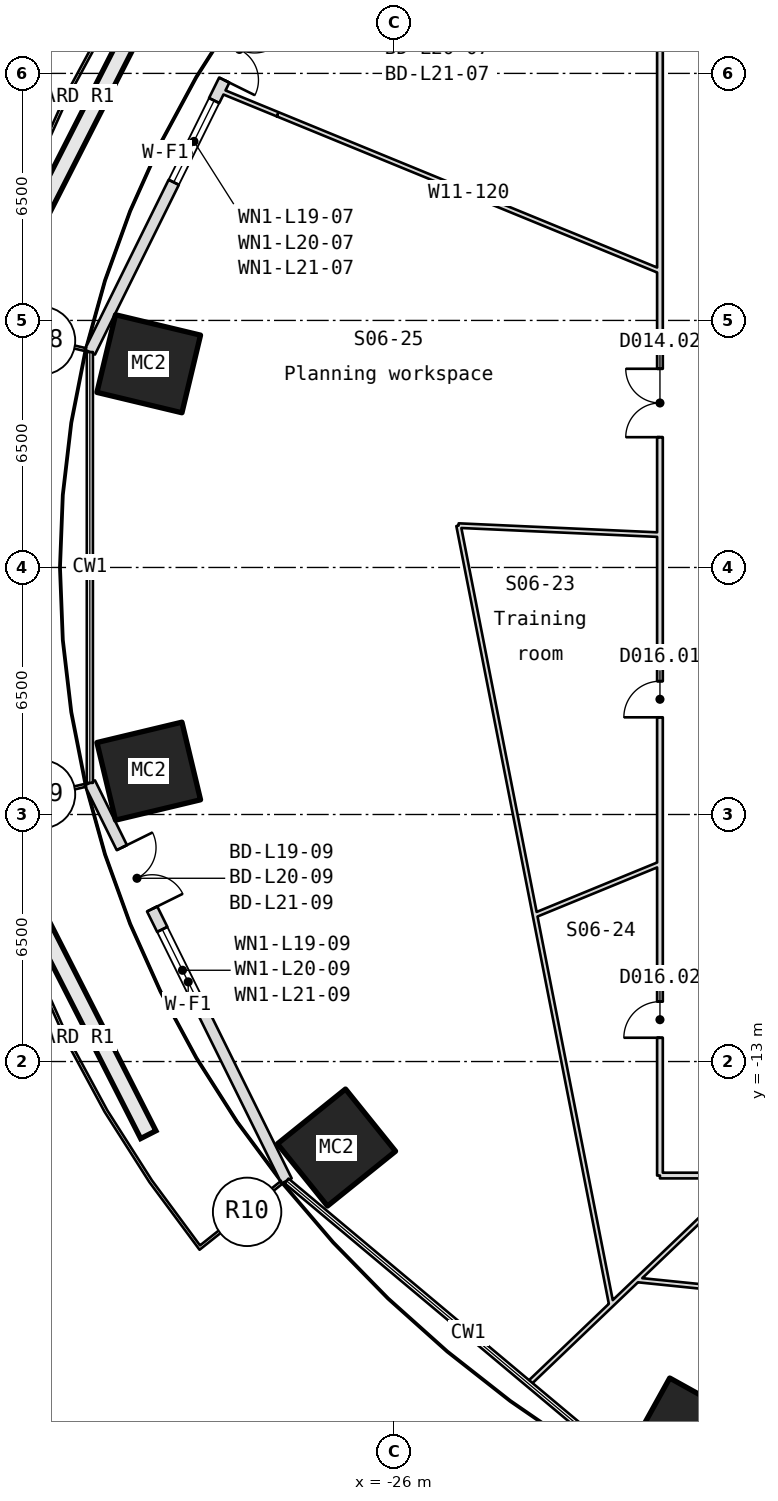
"""IFC4 building model, lengths in metres.
Left out: names, types, materials, properties, quantities, classifications, styles, units other than length and angle.
Written with IfcOpenShell. Run it as: python <this file> out.ifc"""

import sys

from ifc_helpers import new_model, si_unit, direction, frame, frame_2d, origin, origin_2d, place, context, subcontext, project, spatial, rectangle, hollow_rectangle, extrude, element, fill, save


model = new_model("IFC4")
c1 = context("Model", 3, precision=1e-05, world=origin(), true_north=direction((0.0, 1.0)))
c2 = subcontext(c1, "Body", "Model", "MODEL_VIEW")
j1 = project(units=[si_unit("LENGTHUNIT", "METRE"), si_unit("PLANEANGLEUNIT", "RADIAN")], contexts=[c1])
p1 = place(None, origin())
s1 = spatial("IfcSite", under=j1, at=p1, CompositionType="ELEMENT")
p2 = place(p1, origin())
s2 = spatial("IfcBuilding", under=s1, at=p2, CompositionType="ELEMENT")
p3 = place(p2, frame((0.0, 0.0, 95.25)))
s3 = spatial("IfcBuildingStorey", under=s2, at=p3, CompositionType="ELEMENT", Elevation=95.25)
for number, where, z_axis, x_axis in (
    (1, (-32.452, 5.36, -0.18), (0.0, 0.0, 1.0), (0.233, 0.972, 0.0)),
    (2, (-32.452, -5.36, -0.18), (0.0, 0.0, 1.0), (-0.233, 0.972, 0.0)),
    (3, (-27.512, -15.263, -0.18), (0.0, 0.0, 1.0), (-0.627, 0.779, 0.0)),
    (4, (-18.383, -22.843, -0.18), (0.0, 0.0, 1.0), (-0.874, 0.485, 0.0)),
):
    element("IfcColumn", number, at=place(p3, frame(where, z_axis=z_axis, x_axis=x_axis)), inside=s3, PredefinedType="COLUMN", context=c2, shape_type="SweptSolid", body=[
        extrude(hollow_rectangle(XDim=2.1, YDim=2.3, WallThickness=0.085, at=origin_2d()), origin(), (0.0, 0.0, 1.0), 4.15),
    ])
p4 = place(p3, frame((-28.825, 16.141, 0.0), z_axis=(0.0, 0.0, 1.0), x_axis=(-0.4430961796, -0.896474079728, 0.0)))
e5 = element("IfcWall", 5, at=p4, inside=s3, PredefinedType="SOLIDWALL", context=c2, shape_type="SweptSolid", body=[
    extrude(rectangle(XDim=11.683, YDim=0.3, at=frame_2d((5.841, 0.0))), origin(), (0.0, 0.0, 1.0), 3.97),
])
p5 = place(p4, frame((1.9, 0.0, 0.0)))
e6 = element("IfcOpeningElement", 6, at=p5, cuts=e5, PredefinedType="OPENING", context=c2, shape_type="SweptSolid", body=[
    extrude(rectangle(XDim=1.8, YDim=2.4, at=frame_2d((0.9, 1.2))), frame((0.0, 0.16, 0.0), z_axis=(0.0, -1.0, 0.0), x_axis=(1.0, 0.0, 0.0)), (0.0, 0.0, 1.0), 0.32),
])
p6 = place(p4, frame((4.3, 0.0, 0.9)))
e7 = element("IfcOpeningElement", 7, at=p6, cuts=e5, PredefinedType="OPENING", context=c2, shape_type="SweptSolid", body=[
    extrude(rectangle(XDim=2.4, YDim=1.5, at=frame_2d((1.2, 0.75))), frame((0.0, 0.16, 0.0), z_axis=(0.0, -1.0, 0.0), x_axis=(1.0, 0.0, 0.0)), (0.0, 0.0, 1.0), 0.32),
])
p7 = place(p3, frame((-34.002, -5.668, 0.0), z_axis=(0.0, 0.0, 1.0), x_axis=(0.4430961796, -0.896474079728, 0.0)))
e8 = element("IfcWall", 8, at=p7, inside=s3, PredefinedType="SOLIDWALL", context=c2, shape_type="SweptSolid", body=[
    extrude(rectangle(XDim=11.683, YDim=0.3, at=frame_2d((5.841, 0.0))), origin(), (0.0, 0.0, 1.0), 3.97),
])
p8 = place(p7, frame((1.9, 0.0, 0.0)))
e9 = element("IfcOpeningElement", 9, at=p8, cuts=e8, PredefinedType="OPENING", context=c2, shape_type="SweptSolid", body=[
    extrude(rectangle(XDim=1.8, YDim=2.4, at=frame_2d((0.9, 1.2))), frame((0.0, 0.16, 0.0), z_axis=(0.0, -1.0, 0.0), x_axis=(1.0, 0.0, 0.0)), (0.0, 0.0, 1.0), 0.32),
])
p9 = place(p7, frame((4.3, 0.0, 0.9)))
e10 = element("IfcOpeningElement", 10, at=p9, cuts=e8, PredefinedType="OPENING", context=c2, shape_type="SweptSolid", body=[
    extrude(rectangle(XDim=2.4, YDim=1.5, at=frame_2d((1.2, 0.75))), frame((0.0, 0.16, 0.0), z_axis=(0.0, -1.0, 0.0), x_axis=(1.0, 0.0, 0.0)), (0.0, 0.0, 1.0), 0.32),
])
p10 = place(p3, frame((-24.299, 1.102, 0.0), z_axis=(0.0, 0.0, 1.0), x_axis=(0.192428584769, -0.98131098015, 0.0)))
e11 = element("IfcWall", 11, at=p10, inside=s3, PredefinedType="PARTITIONING", context=c2, shape_type="SweptSolid", body=[
    extrude(rectangle(XDim=20.888, YDim=0.12, at=frame_2d((10.444, 0.0))), origin(), (0.0, 0.0, 1.0), 3.97),
])
p11 = place(p3, frame((-24.299, 1.102, 0.0), z_axis=(0.0, 0.0, 1.0), x_axis=(0.998974036647, -0.045286577539, 0.0)))
e12 = element("IfcWall", 12, at=p11, inside=s3, PredefinedType="PARTITIONING", context=c2, shape_type="SweptSolid", body=[
    extrude(rectangle(XDim=5.305, YDim=0.12, at=frame_2d((2.652, 0.0))), origin(), (0.0, 0.0, 1.0), 3.97),
])
p12 = place(p3, frame((-22.29, -9.147, 0.0), z_axis=(0.0, 0.0, 1.0), x_axis=(0.92513955931, 0.379627180008, 0.0)))
e13 = element("IfcWall", 13, at=p12, inside=s3, PredefinedType="PARTITIONING", context=c2, shape_type="SweptSolid", body=[
    extrude(rectangle(XDim=3.556, YDim=0.12, at=frame_2d((1.778, 0.0))), origin(), (0.0, 0.0, 1.0), 3.358),
])
p13 = place(p3, frame((-19.601, -18.747, 0.0), z_axis=(0.0, 0.0, 1.0), x_axis=(0.994814570483, -0.101705311343, 0.0)))
e14 = element("IfcWall", 14, at=p13, inside=s3, PredefinedType="PARTITIONING", context=c2, shape_type="SweptSolid", body=[
    extrude(rectangle(XDim=28.126, YDim=0.12, at=frame_2d((14.063, 0.0))), origin(), (0.0, 0.0, 1.0), 3.97),
])
p14 = place(p13, frame((3.407, 0.0, 0.0)))
e15 = element("IfcOpeningElement", 15, at=p14, cuts=e14, PredefinedType="OPENING", context=c2, shape_type="SweptSolid", body=[
    extrude(rectangle(XDim=0.95, YDim=2.1, at=frame_2d((0.475, 1.05))), frame((0.0, 0.07, 0.0), z_axis=(0.0, -1.0, 0.0), x_axis=(1.0, 0.0, 0.0)), (0.0, 0.0, 1.0), 0.14),
])
p15 = place(p13, frame((12.444, 0.0, 0.0)))
e16 = element("IfcOpeningElement", 16, at=p15, cuts=e14, PredefinedType="OPENING", context=c2, shape_type="SweptSolid", body=[
    extrude(rectangle(XDim=0.95, YDim=2.1, at=frame_2d((0.475, 1.05))), frame((0.0, 0.07, 0.0), z_axis=(0.0, -1.0, 0.0), x_axis=(1.0, 0.0, 0.0)), (0.0, 0.0, 1.0), 0.14),
])
p16 = place(p13, frame((22.625, 0.0, 0.0)))
e17 = element("IfcOpeningElement", 17, at=p16, cuts=e14, PredefinedType="OPENING", context=c2, shape_type="SweptSolid", body=[
    extrude(rectangle(XDim=0.95, YDim=2.1, at=frame_2d((0.475, 1.05))), frame((0.0, 0.07, 0.0), z_axis=(0.0, -1.0, 0.0), x_axis=(1.0, 0.0, 0.0)), (0.0, 0.0, 1.0), 0.14),
])
p17 = place(p3, frame((-19.0, -16.0, 0.0), z_axis=(0.0, 0.0, 1.0), x_axis=(0.0, 1.0, 0.0)))
e18 = element("IfcWall", 18, at=p17, inside=s3, PredefinedType="PARTITIONING", context=c2, shape_type="SweptSolid", body=[
    extrude(rectangle(XDim=32.0, YDim=0.15, at=frame_2d((16.0, 0.0))), origin(), (0.0, 0.0, 1.0), 3.97),
])
p18 = place(p17, frame((12.057, 0.0, 0.0)))
e19 = element("IfcOpeningElement", 19, at=p18, cuts=e18, PredefinedType="OPENING", context=c2, shape_type="SweptSolid", body=[
    extrude(rectangle(XDim=0.95, YDim=2.1, at=frame_2d((0.475, 1.05))), frame((0.0, 0.085, 0.0), z_axis=(0.0, -1.0, 0.0), x_axis=(1.0, 0.0, 0.0)), (0.0, 0.0, 1.0), 0.17),
])
p19 = place(p17, frame((3.626, 0.0, 0.0)))
e20 = element("IfcOpeningElement", 20, at=p19, cuts=e18, PredefinedType="OPENING", context=c2, shape_type="SweptSolid", body=[
    extrude(rectangle(XDim=0.95, YDim=2.1, at=frame_2d((0.475, 1.05))), frame((0.0, 0.085, 0.0), z_axis=(0.0, -1.0, 0.0), x_axis=(1.0, 0.0, 0.0)), (0.0, 0.0, 1.0), 0.17),
])
p20 = place(p17, frame((19.428, 0.0, 0.0)))
e21 = element("IfcOpeningElement", 21, at=p20, cuts=e18, PredefinedType="OPENING", context=c2, shape_type="SweptSolid", body=[
    extrude(rectangle(XDim=1.8, YDim=2.1, at=frame_2d((0.9, 1.05))), frame((0.0, 0.085, 0.0), z_axis=(0.0, -1.0, 0.0), x_axis=(1.0, 0.0, 0.0)), (0.0, 0.0, 1.0), 0.17),
])
p21 = place(p3, frame((-19.0, 7.796, 0.0), z_axis=(0.0, 0.0, 1.0), x_axis=(-0.925143345305, 0.379617953524, 0.0)))
e22 = element("IfcWall", 22, at=p21, inside=s3, PredefinedType="PARTITIONING", context=c2, shape_type="SweptSolid", body=[
    extrude(rectangle(XDim=10.873, YDim=0.12, at=frame_2d((5.437, 0.0))), origin(), (0.0, 0.0, 1.0), 3.358),
])
p22 = place(p3, frame((-29.059, 11.924, 0.0), z_axis=(0.0, 0.0, 1.0), x_axis=(-0.925139536351, 0.379627235957, 0.0)))
e23 = element("IfcWall", 23, at=p22, inside=s3, PredefinedType="PARTITIONING", context=c2, shape_type="SweptSolid", body=[
    extrude(rectangle(XDim=1.663, YDim=0.12, at=frame_2d((0.832, 0.0))), origin(), (0.0, 0.0, 1.0), 3.97),
])
p23 = place(p3, frame((-16.729, -16.0, 0.0), z_axis=(0.0, 0.0, 1.0), x_axis=(-0.722671289977, -0.69119187397, 0.0)))
e24 = element("IfcWall", 24, at=p23, inside=s3, PredefinedType="PARTITIONING", context=c2, shape_type="SweptSolid", body=[
    extrude(rectangle(XDim=7.926, YDim=0.12, at=frame_2d((3.963, 0.0))), origin(), (0.0, 0.0, 1.0), 3.97),
])
p24 = place(p3, frame((19.0, -16.0, 0.0), z_axis=(0.0, 0.0, 1.0), x_axis=(-1.0, 0.0, 0.0)))
e25 = element("IfcWall", 25, at=p24, inside=s3, PredefinedType="PARTITIONING", context=c2, shape_type="SweptSolid", body=[
    extrude(rectangle(XDim=38.0, YDim=0.15, at=frame_2d((19.0, 0.0))), origin(), (0.0, 0.0, 1.0), 3.97),
])
p25 = place(p24, frame((23.362, 0.0, 0.0)))
e26 = element("IfcOpeningElement", 26, at=p25, cuts=e25, PredefinedType="OPENING", context=c2, shape_type="SweptSolid", body=[
    extrude(rectangle(XDim=1.8, YDim=2.1, at=frame_2d((0.9, 1.05))), frame((0.0, 0.085, 0.0), z_axis=(0.0, -1.0, 0.0), x_axis=(1.0, 0.0, 0.0)), (0.0, 0.0, 1.0), 0.17),
])
p26 = place(p24, frame((6.62, 0.0, 0.0)))
e27 = element("IfcOpeningElement", 27, at=p26, cuts=e25, PredefinedType="OPENING", context=c2, shape_type="SweptSolid", body=[
    extrude(rectangle(XDim=0.95, YDim=2.1, at=frame_2d((0.475, 1.05))), frame((0.0, 0.085, 0.0), z_axis=(0.0, -1.0, 0.0), x_axis=(1.0, 0.0, 0.0)), (0.0, 0.0, 1.0), 0.17),
])
p27 = place(p24, frame((1.982, 0.0, 0.0)))
e28 = element("IfcOpeningElement", 28, at=p27, cuts=e25, PredefinedType="OPENING", context=c2, shape_type="SweptSolid", body=[
    extrude(rectangle(XDim=0.95, YDim=2.1, at=frame_2d((0.475, 1.05))), frame((0.0, 0.085, 0.0), z_axis=(0.0, -1.0, 0.0), x_axis=(1.0, 0.0, 0.0)), (0.0, 0.0, 1.0), 0.17),
])
p28 = place(p24, frame((10.56, 0.0, 0.0)))
e29 = element("IfcOpeningElement", 29, at=p28, cuts=e25, PredefinedType="OPENING", context=c2, shape_type="SweptSolid", body=[
    extrude(rectangle(XDim=0.95, YDim=2.1, at=frame_2d((0.475, 1.05))), frame((0.0, 0.085, 0.0), z_axis=(0.0, -1.0, 0.0), x_axis=(1.0, 0.0, 0.0)), (0.0, 0.0, 1.0), 0.17),
])
p29 = place(p5, origin())
e30 = element("IfcDoor", 30, at=p29, inside=s3, OperationType="SINGLE_SWING_LEFT", PredefinedType="DOOR", context=c2, shape_type="SweptSolid", body=[
    extrude(rectangle(XDim=1.8, YDim=2.4, at=frame_2d((0.9, 1.2))), frame((0.0, 0.025, 0.0), z_axis=(0.0, -1.0, 0.0), x_axis=(1.0, 0.0, 0.0)), (0.0, 0.0, 1.0), 0.05),
])
fill(e6, e30)
p30 = place(p6, origin())
e31 = element("IfcWindow", 31, at=p30, inside=s3, PartitioningType="SINGLE_PANEL", PredefinedType="WINDOW", context=c2, shape_type="SweptSolid", body=[
    extrude(rectangle(XDim=2.4, YDim=1.5, at=frame_2d((1.2, 0.75))), frame((0.0, 0.03, 0.0), z_axis=(0.0, -1.0, 0.0), x_axis=(1.0, 0.0, 0.0)), (0.0, 0.0, 1.0), 0.06),
])
fill(e7, e31)
p31 = place(p8, origin())
e32 = element("IfcDoor", 32, at=p31, inside=s3, OperationType="SINGLE_SWING_LEFT", PredefinedType="DOOR", context=c2, shape_type="SweptSolid", body=[
    extrude(rectangle(XDim=1.8, YDim=2.4, at=frame_2d((0.9, 1.2))), frame((0.0, 0.025, 0.0), z_axis=(0.0, -1.0, 0.0), x_axis=(1.0, 0.0, 0.0)), (0.0, 0.0, 1.0), 0.05),
])
fill(e9, e32)
p32 = place(p9, origin())
e33 = element("IfcWindow", 33, at=p32, inside=s3, PartitioningType="SINGLE_PANEL", PredefinedType="WINDOW", context=c2, shape_type="SweptSolid", body=[
    extrude(rectangle(XDim=2.4, YDim=1.5, at=frame_2d((1.2, 0.75))), frame((0.0, 0.03, 0.0), z_axis=(0.0, -1.0, 0.0), x_axis=(1.0, 0.0, 0.0)), (0.0, 0.0, 1.0), 0.06),
])
fill(e10, e33)
p33 = place(p18, origin())
e34 = element("IfcDoor", 34, at=p33, inside=s3, OperationType="SINGLE_SWING_RIGHT", PredefinedType="DOOR", context=c2, shape_type="SweptSolid", body=[
    extrude(rectangle(XDim=0.95, YDim=2.1, at=frame_2d((0.475, 1.05))), frame((0.0, 0.025, 0.0), z_axis=(0.0, -1.0, 0.0), x_axis=(1.0, 0.0, 0.0)), (0.0, 0.0, 1.0), 0.05),
])
fill(e19, e34)
p34 = place(p19, origin())
e35 = element("IfcDoor", 35, at=p34, inside=s3, OperationType="SINGLE_SWING_RIGHT", PredefinedType="DOOR", context=c2, shape_type="SweptSolid", body=[
    extrude(rectangle(XDim=0.95, YDim=2.1, at=frame_2d((0.475, 1.05))), frame((0.0, 0.025, 0.0), z_axis=(0.0, -1.0, 0.0), x_axis=(1.0, 0.0, 0.0)), (0.0, 0.0, 1.0), 0.05),
])
fill(e20, e35)
p35 = place(p20, origin())
e36 = element("IfcDoor", 36, at=p35, inside=s3, OperationType="DOUBLE_DOOR_SINGLE_SWING", PredefinedType="DOOR", context=c2, shape_type="SweptSolid", body=[
    extrude(rectangle(XDim=1.8, YDim=2.1, at=frame_2d((0.9, 1.05))), frame((0.0, 0.025, 0.0), z_axis=(0.0, -1.0, 0.0), x_axis=(1.0, 0.0, 0.0)), (0.0, 0.0, 1.0), 0.05),
])
fill(e21, e36)
save(model, sys.argv[1])
